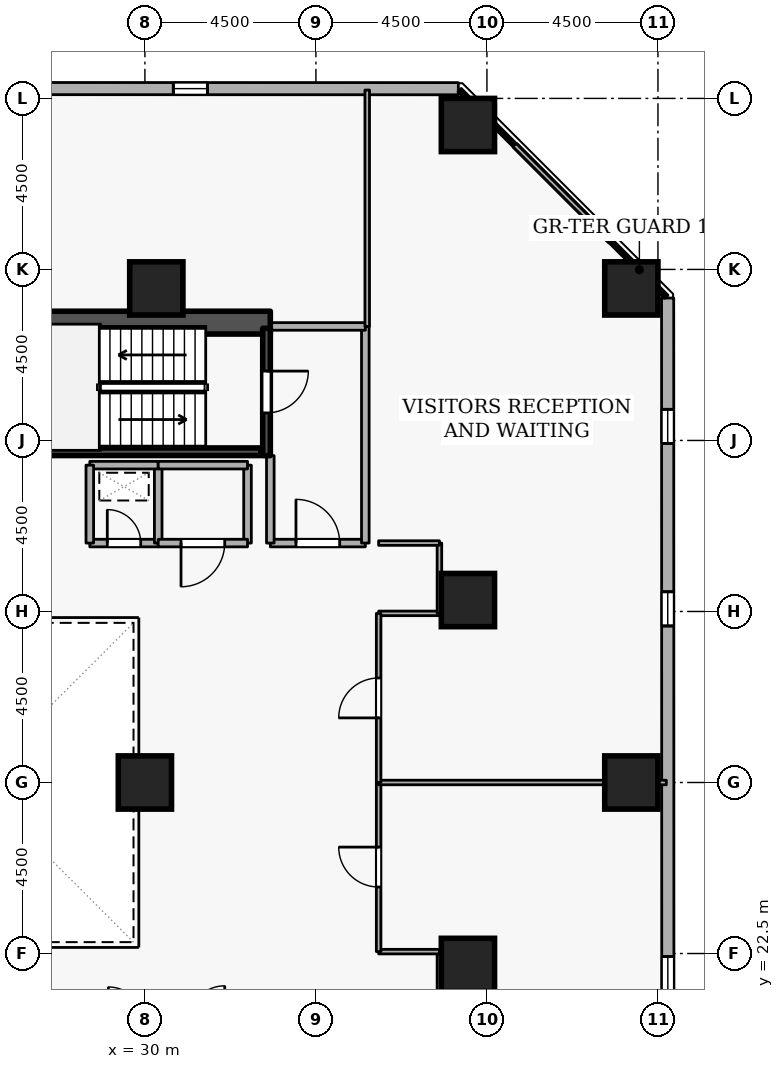
"""IFC4 building model, lengths in metres.
Left out: names, types, materials, properties, quantities, classifications, styles, units other than length and angle.
Written with IfcOpenShell. Run it as: python <this file> out.ifc"""

import sys

from ifc_helpers import new_model, si_unit, direction, frame, frame_2d, origin, origin_2d, place, context, subcontext, project, spatial, rectangle, extrude, element, fill, save


model = new_model("IFC4")
c1 = context("Model", 3, precision=1e-05, world=origin(), true_north=direction((0.0, 1.0)))
c2 = subcontext(c1, "Body", "Model", "MODEL_VIEW")
j1 = project(units=[si_unit("LENGTHUNIT", "METRE"), si_unit("PLANEANGLEUNIT", "RADIAN")], contexts=[c1])
p1 = place(None, origin())
s1 = spatial("IfcSite", under=j1, at=p1, CompositionType="ELEMENT")
p2 = place(p1, origin())
s2 = spatial("IfcBuilding", under=s1, at=p2, CompositionType="ELEMENT")
p3 = place(p2, frame((0.0, 0.0, 35.1)))
s3 = spatial("IfcBuildingStorey", under=s2, at=p3, CompositionType="ELEMENT", Elevation=35.1)
p4 = place(p3, frame((17.7, 39.1, 0.0), z_axis=(0.0, 0.0, 1.0), x_axis=(1.0, 0.0, 0.0)))
e1 = element("IfcWall", 1, at=p4, inside=s3, PredefinedType="SHEAR", context=c2, shape_type="SweptSolid", body=[
    extrude(rectangle(XDim=15.6, YDim=0.6, at=frame_2d((7.8, 0.0))), origin(), (0.0, 0.0, 1.0), 3.6),
])
for number, where, z_axis, x_axis in (
    (2, (42.8, 27.0, 0.0), (0.0, 0.0, 1.0), (1.0, 0.0, 0.0)),
    (3, (42.8, 40.0, 0.0), (0.0, 0.0, 1.0), (1.0, 0.0, 0.0)),
    (4, (38.5, 44.3, 0.0), (0.0, 0.0, 1.0), (1.0, 0.0, 0.0)),
    (5, (38.5, 22.2, 0.0), (0.0, 0.0, 1.0), (1.0, 0.0, 0.0)),
    (6, (38.5, 31.8, 0.0), (0.0, 0.0, 1.0), (1.0, 0.0, 0.0)),
    (7, (30.3, 40.0, 0.0), (0.0, 0.0, 1.0), (1.0, 0.0, 0.0)),
    (8, (30.0, 27.0, 0.0), (0.0, 0.0, 1.0), (1.0, 0.0, 0.0)),
):
    element("IfcColumn", number, at=place(p3, frame(where, z_axis=z_axis, x_axis=x_axis)), inside=s3, PredefinedType="COLUMN", context=c2, shape_type="SweptSolid", body=[
        extrude(rectangle(XDim=1.4, YDim=1.4, at=origin_2d()), origin(), (0.0, 0.0, 1.0), 3.6),
    ])
p5 = place(p3, frame((43.765, 5.319, 0.0), z_axis=(0.0, 0.0, 1.0), x_axis=(-0.000276554545, 0.999999961759, 0.0)))
e9 = element("IfcWall", 9, at=p5, inside=s3, PredefinedType="STANDARD", context=c2, shape_type="SweptSolid", body=[
    extrude(rectangle(XDim=34.429, YDim=0.32, at=frame_2d((17.214, 0.0))), origin(), (0.0, 0.0, 1.0), 2.7),
])
p6 = place(p5, frame((1.8, 0.0, 0.72)))
e10 = element("IfcOpeningElement", 10, at=p6, cuts=e9, PredefinedType="OPENING", context=c2, shape_type="SweptSolid", body=[
    extrude(rectangle(XDim=0.9, YDim=1.75, at=frame_2d((0.45, 0.875))), frame((0.0, 0.17, 0.0), z_axis=(0.0, -1.0, 0.0), x_axis=(1.0, 0.0, 0.0)), (0.0, 0.0, 1.0), 0.34),
])
p7 = place(p5, frame((6.6, 0.0, 0.72)))
e11 = element("IfcOpeningElement", 11, at=p7, cuts=e9, PredefinedType="OPENING", context=c2, shape_type="SweptSolid", body=[
    extrude(rectangle(XDim=0.9, YDim=1.75, at=frame_2d((0.45, 0.875))), frame((0.0, 0.17, 0.0), z_axis=(0.0, -1.0, 0.0), x_axis=(1.0, 0.0, 0.0)), (0.0, 0.0, 1.0), 0.34),
])
p8 = place(p5, frame((11.4, 0.0, 0.72)))
e12 = element("IfcOpeningElement", 12, at=p8, cuts=e9, PredefinedType="OPENING", context=c2, shape_type="SweptSolid", body=[
    extrude(rectangle(XDim=0.9, YDim=1.75, at=frame_2d((0.45, 0.875))), frame((0.0, 0.17, 0.0), z_axis=(0.0, -1.0, 0.0), x_axis=(1.0, 0.0, 0.0)), (0.0, 0.0, 1.0), 0.34),
])
p9 = place(p5, frame((16.2, 0.0, 0.72)))
e13 = element("IfcOpeningElement", 13, at=p9, cuts=e9, PredefinedType="OPENING", context=c2, shape_type="SweptSolid", body=[
    extrude(rectangle(XDim=0.9, YDim=1.75, at=frame_2d((0.45, 0.875))), frame((0.0, 0.17, 0.0), z_axis=(0.0, -1.0, 0.0), x_axis=(1.0, 0.0, 0.0)), (0.0, 0.0, 1.0), 0.34),
])
p10 = place(p5, frame((25.8, 0.0, 0.72)))
e14 = element("IfcOpeningElement", 14, at=p10, cuts=e9, PredefinedType="OPENING", context=c2, shape_type="SweptSolid", body=[
    extrude(rectangle(XDim=0.9, YDim=1.75, at=frame_2d((0.45, 0.875))), frame((0.0, 0.17, 0.0), z_axis=(0.0, -1.0, 0.0), x_axis=(1.0, 0.0, 0.0)), (0.0, 0.0, 1.0), 0.34),
])
p11 = place(p5, frame((30.6, 0.0, 0.72)))
e15 = element("IfcOpeningElement", 15, at=p11, cuts=e9, PredefinedType="OPENING", context=c2, shape_type="SweptSolid", body=[
    extrude(rectangle(XDim=0.9, YDim=1.75, at=frame_2d((0.45, 0.875))), frame((0.0, 0.17, 0.0), z_axis=(0.0, -1.0, 0.0), x_axis=(1.0, 0.0, 0.0)), (0.0, 0.0, 1.0), 0.34),
])
p12 = place(p3, frame((38.248, 45.255, 0.0), z_axis=(0.0, 0.0, 1.0), x_axis=(-0.999999961759, 0.000276554545, 0.0)))
e16 = element("IfcWall", 16, at=p12, inside=s3, PredefinedType="STANDARD", context=c2, shape_type="SweptSolid", body=[
    extrude(rectangle(XDim=34.429, YDim=0.32, at=frame_2d((17.214, 0.0))), origin(), (0.0, 0.0, 1.0), 2.7),
])
p13 = place(p12, frame((6.6, 0.0, 0.72)))
e17 = element("IfcOpeningElement", 17, at=p13, cuts=e16, PredefinedType="OPENING", context=c2, shape_type="SweptSolid", body=[
    extrude(rectangle(XDim=0.9, YDim=1.75, at=frame_2d((0.45, 0.875))), frame((0.0, 0.17, 0.0), z_axis=(0.0, -1.0, 0.0), x_axis=(1.0, 0.0, 0.0)), (0.0, 0.0, 1.0), 0.34),
])
p14 = place(p12, frame((16.2, 0.0, 0.72)))
e18 = element("IfcOpeningElement", 18, at=p14, cuts=e16, PredefinedType="OPENING", context=c2, shape_type="SweptSolid", body=[
    extrude(rectangle(XDim=0.9, YDim=1.75, at=frame_2d((0.45, 0.875))), frame((0.0, 0.17, 0.0), z_axis=(0.0, -1.0, 0.0), x_axis=(1.0, 0.0, 0.0)), (0.0, 0.0, 1.0), 0.34),
])
p15 = place(p12, frame((21.0, 0.0, 0.72)))
e19 = element("IfcOpeningElement", 19, at=p15, cuts=e16, PredefinedType="OPENING", context=c2, shape_type="SweptSolid", body=[
    extrude(rectangle(XDim=0.9, YDim=1.75, at=frame_2d((0.45, 0.875))), frame((0.0, 0.17, 0.0), z_axis=(0.0, -1.0, 0.0), x_axis=(1.0, 0.0, 0.0)), (0.0, 0.0, 1.0), 0.34),
])
p16 = place(p12, frame((30.6, 0.0, 0.72)))
e20 = element("IfcOpeningElement", 20, at=p16, cuts=e16, PredefinedType="OPENING", context=c2, shape_type="SweptSolid", body=[
    extrude(rectangle(XDim=0.9, YDim=1.75, at=frame_2d((0.45, 0.875))), frame((0.0, 0.17, 0.0), z_axis=(0.0, -1.0, 0.0), x_axis=(1.0, 0.0, 0.0)), (0.0, 0.0, 1.0), 0.34),
])
p17 = place(p3, frame((33.2, 38.95, 0.0), z_axis=(0.0, 0.0, 1.0), x_axis=(0.0, -1.0, 0.0)))
e21 = element("IfcWall", 21, at=p17, inside=s3, PredefinedType="SHEAR", context=c2, shape_type="SweptSolid", body=[
    extrude(rectangle(XDim=3.35, YDim=0.2, at=frame_2d((1.675, 0.0))), origin(), (0.0, 0.0, 1.0), 3.6),
])
p18 = place(p17, frame((1.125, 0.0, 0.0)))
e22 = element("IfcOpeningElement", 22, at=p18, cuts=e21, PredefinedType="OPENING", context=c2, shape_type="SweptSolid", body=[
    extrude(rectangle(XDim=1.1, YDim=2.1, at=frame_2d((0.55, 1.05))), frame((0.0, 0.11, 0.0), z_axis=(0.0, -1.0, 0.0), x_axis=(1.0, 0.0, 0.0)), (0.0, 0.0, 1.0), 0.22),
])
p19 = place(p3, frame((25.95, 35.703, 0.0), z_axis=(0.0, 0.0, 1.0), x_axis=(1.0, 0.0, 0.0)))
e23 = element("IfcWall", 23, at=p19, inside=s3, PredefinedType="SHEAR", context=c2, shape_type="SweptSolid", body=[
    extrude(rectangle(XDim=7.1, YDim=0.2, at=frame_2d((3.55, 0.0))), origin(), (0.0, 0.0, 1.0), 3.6),
])
p20 = place(p3, frame((33.3, 33.3, 0.0), z_axis=(0.0, 0.0, 1.0), x_axis=(1.0, 0.0, 0.0)))
e24 = element("IfcWall", 24, at=p20, inside=s3, PredefinedType="STANDARD", context=c2, shape_type="SweptSolid", body=[
    extrude(rectangle(XDim=2.5, YDim=0.2, at=frame_2d((1.25, 0.0))), origin(), (0.0, 0.0, 1.0), 3.34),
])
p21 = place(p20, frame((0.675, 0.0, 0.0)))
e25 = element("IfcOpeningElement", 25, at=p21, cuts=e24, PredefinedType="OPENING", context=c2, shape_type="SweptSolid", body=[
    extrude(rectangle(XDim=1.15, YDim=2.1, at=frame_2d((0.575, 1.05))), frame((0.0, 0.11, 0.0), z_axis=(0.0, -1.0, 0.0), x_axis=(1.0, 0.0, 0.0)), (0.0, 0.0, 1.0), 0.22),
])
p22 = place(p3, frame((35.8, 33.3, 0.0), z_axis=(0.0, 0.0, 1.0), x_axis=(0.0, 1.0, 0.0)))
e26 = element("IfcWall", 26, at=p22, inside=s3, PredefinedType="STANDARD", context=c2, shape_type="SweptSolid", body=[
    extrude(rectangle(XDim=5.7, YDim=0.2, at=frame_2d((2.85, 0.0))), origin(), (0.0, 0.0, 1.0), 3.34),
])
p23 = place(p3, frame((35.8, 39.0, 0.0), z_axis=(0.0, 0.0, 1.0), x_axis=(-1.0, 0.0, 0.0)))
e27 = element("IfcWall", 27, at=p23, inside=s3, PredefinedType="STANDARD", context=c2, shape_type="SweptSolid", body=[
    extrude(rectangle(XDim=2.5, YDim=0.2, at=frame_2d((1.25, 0.0))), origin(), (0.0, 0.0, 1.0), 3.34),
])
p24 = place(p3, frame((33.3, 35.6, 0.0), z_axis=(0.0, 0.0, 1.0), x_axis=(0.0, -1.0, 0.0)))
e28 = element("IfcWall", 28, at=p24, inside=s3, PredefinedType="STANDARD", context=c2, shape_type="SweptSolid", body=[
    extrude(rectangle(XDim=2.3, YDim=0.2, at=frame_2d((1.15, 0.0))), origin(), (0.0, 0.0, 1.0), 2.545),
])
p25 = place(p3, frame((28.55, 33.3, 0.0), z_axis=(0.0, 0.0, 1.0), x_axis=(1.0, 0.0, 0.0)))
e29 = element("IfcWall", 29, at=p25, inside=s3, PredefinedType="STANDARD", context=c2, shape_type="SweptSolid", body=[
    extrude(rectangle(XDim=1.8, YDim=0.2, at=frame_2d((0.9, 0.0))), origin(), (0.0, 0.0, 1.0), 3.34),
])
p26 = place(p25, frame((0.46, 0.0, 0.0)))
e30 = element("IfcOpeningElement", 30, at=p26, cuts=e29, PredefinedType="OPENING", context=c2, shape_type="SweptSolid", body=[
    extrude(rectangle(XDim=0.88, YDim=2.04, at=frame_2d((0.44, 1.02))), frame((0.0, 0.11, 0.0), z_axis=(0.0, -1.0, 0.0), x_axis=(1.0, 0.0, 0.0)), (0.0, 0.0, 1.0), 0.22),
])
p27 = place(p3, frame((30.35, 33.3, 0.0), z_axis=(0.0, 0.0, 1.0), x_axis=(0.0, 1.0, 0.0)))
e31 = element("IfcWall", 31, at=p27, inside=s3, PredefinedType="STANDARD", context=c2, shape_type="SweptSolid", body=[
    extrude(rectangle(XDim=2.05, YDim=0.2, at=frame_2d((1.025, 0.0))), origin(), (0.0, 0.0, 1.0), 3.34),
])
p28 = place(p3, frame((30.35, 35.35, 0.0), z_axis=(0.0, 0.0, 1.0), x_axis=(-1.0, 0.0, 0.0)))
e32 = element("IfcWall", 32, at=p28, inside=s3, PredefinedType="STANDARD", context=c2, shape_type="SweptSolid", body=[
    extrude(rectangle(XDim=1.8, YDim=0.2, at=frame_2d((0.9, 0.0))), origin(), (0.0, 0.0, 1.0), 3.34),
])
p29 = place(p3, frame((28.55, 35.35, 0.0), z_axis=(0.0, 0.0, 1.0), x_axis=(0.0, -1.0, 0.0)))
e33 = element("IfcWall", 33, at=p29, inside=s3, PredefinedType="STANDARD", context=c2, shape_type="SweptSolid", body=[
    extrude(rectangle(XDim=2.05, YDim=0.2, at=frame_2d((1.025, 0.0))), origin(), (0.0, 0.0, 1.0), 3.34),
])
p30 = place(p3, frame((32.7, 35.35, 0.0), z_axis=(0.0, 0.0, 1.0), x_axis=(0.0, -1.0, 0.0)))
e34 = element("IfcWall", 34, at=p30, inside=s3, PredefinedType="STANDARD", context=c2, shape_type="SweptSolid", body=[
    extrude(rectangle(XDim=2.05, YDim=0.2, at=frame_2d((1.025, 0.0))), origin(), (0.0, 0.0, 1.0), 2.545),
])
p31 = place(p3, frame((32.7, 33.3, 0.0), z_axis=(0.0, 0.0, 1.0), x_axis=(-1.0, 0.0, 0.0)))
e35 = element("IfcWall", 35, at=p31, inside=s3, PredefinedType="STANDARD", context=c2, shape_type="SweptSolid", body=[
    extrude(rectangle(XDim=2.35, YDim=0.2, at=frame_2d((1.175, 0.0))), origin(), (0.0, 0.0, 1.0), 3.34),
])
p32 = place(p31, frame((0.6, 0.0, 0.0)))
e36 = element("IfcOpeningElement", 36, at=p32, cuts=e35, PredefinedType="OPENING", context=c2, shape_type="SweptSolid", body=[
    extrude(rectangle(XDim=1.15, YDim=2.1, at=frame_2d((0.575, 1.05))), frame((0.0, 0.11, 0.0), z_axis=(0.0, -1.0, 0.0), x_axis=(1.0, 0.0, 0.0)), (0.0, 0.0, 1.0), 0.22),
])
p33 = place(p3, frame((30.35, 35.35, 0.0), z_axis=(0.0, 0.0, 1.0), x_axis=(1.0, 0.0, 0.0)))
e37 = element("IfcWall", 37, at=p33, inside=s3, PredefinedType="STANDARD", context=c2, shape_type="SweptSolid", body=[
    extrude(rectangle(XDim=2.35, YDim=0.2, at=frame_2d((1.175, 0.0))), origin(), (0.0, 0.0, 1.0), 3.34),
])
p34 = place(p3, frame((37.75, 20.7, 0.0), z_axis=(0.0, 0.0, 1.0), x_axis=(0.0, 1.0, 0.0)))
e38 = element("IfcWall", 38, at=p34, inside=s3, PredefinedType="PARTITIONING", context=c2, shape_type="SweptSolid", body=[
    extrude(rectangle(XDim=1.85, YDim=0.12, at=frame_2d((0.925, 0.0))), origin(), (0.0, 0.0, 1.0), 3.34),
])
p35 = place(p3, frame((37.75, 22.55, 0.0), z_axis=(0.0, 0.0, 1.0), x_axis=(-1.0, 0.0, 0.0)))
e39 = element("IfcWall", 39, at=p35, inside=s3, PredefinedType="PARTITIONING", context=c2, shape_type="SweptSolid", body=[
    extrude(rectangle(XDim=1.6, YDim=0.12, at=frame_2d((0.8, 0.0))), origin(), (0.0, 0.0, 1.0), 3.34),
])
p36 = place(p3, frame((36.15, 22.55, 0.0), z_axis=(0.0, 0.0, 1.0), x_axis=(0.0, 1.0, 0.0)))
e40 = element("IfcWall", 40, at=p36, inside=s3, PredefinedType="PARTITIONING", context=c2, shape_type="SweptSolid", body=[
    extrude(rectangle(XDim=4.45, YDim=0.12, at=frame_2d((2.225, 0.0))), origin(), (0.0, 0.0, 1.0), 3.34),
])
p37 = place(p36, frame((1.7, 0.0, 0.0)))
e41 = element("IfcOpeningElement", 41, at=p37, cuts=e40, PredefinedType="OPENING", context=c2, shape_type="SweptSolid", body=[
    extrude(rectangle(XDim=1.05, YDim=2.1, at=frame_2d((0.525, 1.05))), frame((0.0, 0.07, 0.0), z_axis=(0.0, -1.0, 0.0), x_axis=(1.0, 0.0, 0.0)), (0.0, 0.0, 1.0), 0.14),
])
p38 = place(p3, frame((36.15, 27.0, 0.0), z_axis=(0.0, 0.0, 1.0), x_axis=(1.0, 0.0, 0.0)))
e42 = element("IfcWall", 42, at=p38, inside=s3, PredefinedType="PARTITIONING", context=c2, shape_type="SweptSolid", body=[
    extrude(rectangle(XDim=7.57, YDim=0.12, at=frame_2d((3.785, 0.0))), origin(), (0.0, 0.0, 1.0), 2.878),
])
p39 = place(p3, frame((36.15, 31.45, 0.0), z_axis=(0.0, 0.0, 1.0), x_axis=(1.0, 0.0, 0.0)))
e43 = element("IfcWall", 43, at=p39, inside=s3, PredefinedType="PARTITIONING", context=c2, shape_type="SweptSolid", body=[
    extrude(rectangle(XDim=1.6, YDim=0.12, at=frame_2d((0.8, 0.0))), origin(), (0.0, 0.0, 1.0), 3.34),
])
p40 = place(p3, frame((37.75, 31.45, 0.0), z_axis=(0.0, 0.0, 1.0), x_axis=(0.0, 1.0, 0.0)))
e44 = element("IfcWall", 44, at=p40, inside=s3, PredefinedType="PARTITIONING", context=c2, shape_type="SweptSolid", body=[
    extrude(rectangle(XDim=1.85, YDim=0.12, at=frame_2d((0.925, 0.0))), origin(), (0.0, 0.0, 1.0), 3.34),
])
p41 = place(p3, frame((37.75, 33.3, 0.0), z_axis=(0.0, 0.0, 1.0), x_axis=(-1.0, 0.0, 0.0)))
e45 = element("IfcWall", 45, at=p41, inside=s3, PredefinedType="PARTITIONING", context=c2, shape_type="SweptSolid", body=[
    extrude(rectangle(XDim=1.6, YDim=0.12, at=frame_2d((0.8, 0.0))), origin(), (0.0, 0.0, 1.0), 3.34),
])
p42 = place(p3, frame((35.85, 39.0, 0.0), z_axis=(0.0, 0.0, 1.0), x_axis=(0.0, 1.0, 0.0)))
e46 = element("IfcWall", 46, at=p42, inside=s3, PredefinedType="PARTITIONING", context=c2, shape_type="SweptSolid", body=[
    extrude(rectangle(XDim=6.22, YDim=0.12, at=frame_2d((3.11, 0.0))), origin(), (0.0, 0.0, 1.0), 3.34),
])
p43 = place(p3, frame((38.281, 45.22, 0.0), z_axis=(0.0, 0.0, 1.0), x_axis=(0.707106781187, -0.707106781187, 0.0)))
e47 = element("IfcWall", 47, at=p43, inside=s3, PredefinedType="PARTITIONING", context=c2, shape_type="SweptSolid", body=[
    extrude(rectangle(XDim=7.693, YDim=0.12, at=frame_2d((3.846, 0.0))), origin(), (0.0, 0.0, 1.0), 3.34),
])
p44 = place(p3, frame((36.15, 27.0, 0.0), z_axis=(0.0, 0.0, 1.0), x_axis=(0.0, 1.0, 0.0)))
e48 = element("IfcWall", 48, at=p44, inside=s3, PredefinedType="PARTITIONING", context=c2, shape_type="SweptSolid", body=[
    extrude(rectangle(XDim=4.45, YDim=0.12, at=frame_2d((2.225, 0.0))), origin(), (0.0, 0.0, 1.0), 3.34),
])
p45 = place(p44, frame((1.7, 0.0, 0.0)))
e49 = element("IfcOpeningElement", 49, at=p45, cuts=e48, PredefinedType="OPENING", context=c2, shape_type="SweptSolid", body=[
    extrude(rectangle(XDim=1.05, YDim=2.1, at=frame_2d((0.525, 1.05))), frame((0.0, 0.07, 0.0), z_axis=(0.0, -1.0, 0.0), x_axis=(1.0, 0.0, 0.0)), (0.0, 0.0, 1.0), 0.14),
])
p46 = place(p9, origin())
e50 = element("IfcWindow", 50, at=p46, inside=s3, PartitioningType="SINGLE_PANEL", PredefinedType="WINDOW", context=c2, shape_type="SweptSolid", body=[
    extrude(rectangle(XDim=0.9, YDim=1.75, at=frame_2d((0.45, 0.875))), frame((0.0, 0.03, 0.0), z_axis=(0.0, -1.0, 0.0), x_axis=(1.0, 0.0, 0.0)), (0.0, 0.0, 1.0), 0.06),
])
fill(e13, e50)
p47 = place(p10, origin())
e51 = element("IfcWindow", 51, at=p47, inside=s3, PartitioningType="SINGLE_PANEL", PredefinedType="WINDOW", context=c2, shape_type="SweptSolid", body=[
    extrude(rectangle(XDim=0.9, YDim=1.75, at=frame_2d((0.45, 0.875))), frame((0.0, 0.03, 0.0), z_axis=(0.0, -1.0, 0.0), x_axis=(1.0, 0.0, 0.0)), (0.0, 0.0, 1.0), 0.06),
])
fill(e14, e51)
p48 = place(p11, origin())
e52 = element("IfcWindow", 52, at=p48, inside=s3, PartitioningType="SINGLE_PANEL", PredefinedType="WINDOW", context=c2, shape_type="SweptSolid", body=[
    extrude(rectangle(XDim=0.9, YDim=1.75, at=frame_2d((0.45, 0.875))), frame((0.0, 0.03, 0.0), z_axis=(0.0, -1.0, 0.0), x_axis=(1.0, 0.0, 0.0)), (0.0, 0.0, 1.0), 0.06),
])
fill(e15, e52)
p49 = place(p13, origin())
e53 = element("IfcWindow", 53, at=p49, inside=s3, PartitioningType="SINGLE_PANEL", PredefinedType="WINDOW", context=c2, shape_type="SweptSolid", body=[
    extrude(rectangle(XDim=0.9, YDim=1.75, at=frame_2d((0.45, 0.875))), frame((0.0, 0.03, 0.0), z_axis=(0.0, -1.0, 0.0), x_axis=(1.0, 0.0, 0.0)), (0.0, 0.0, 1.0), 0.06),
])
fill(e17, e53)
p50 = place(p18, origin())
e54 = element("IfcDoor", 54, at=p50, inside=s3, OperationType="SINGLE_SWING_LEFT", PredefinedType="DOOR", context=c2, shape_type="SweptSolid", body=[
    extrude(rectangle(XDim=1.1, YDim=2.1, at=frame_2d((0.55, 1.05))), frame((0.0, 0.025, 0.0), z_axis=(0.0, -1.0, 0.0), x_axis=(1.0, 0.0, 0.0)), (0.0, 0.0, 1.0), 0.05),
])
fill(e22, e54)
p51 = place(p21, origin())
e55 = element("IfcDoor", 55, at=p51, inside=s3, OperationType="SINGLE_SWING_LEFT", PredefinedType="DOOR", context=c2, shape_type="SweptSolid", body=[
    extrude(rectangle(XDim=1.15, YDim=2.1, at=frame_2d((0.575, 1.05))), frame((0.0, 0.025, 0.0), z_axis=(0.0, -1.0, 0.0), x_axis=(1.0, 0.0, 0.0)), (0.0, 0.0, 1.0), 0.05),
])
fill(e25, e55)
p52 = place(p26, origin())
e56 = element("IfcDoor", 56, at=p52, inside=s3, OperationType="SINGLE_SWING_LEFT", PredefinedType="DOOR", context=c2, shape_type="SweptSolid", body=[
    extrude(rectangle(XDim=0.88, YDim=2.04, at=frame_2d((0.44, 1.02))), frame((0.0, 0.025, 0.0), z_axis=(0.0, -1.0, 0.0), x_axis=(1.0, 0.0, 0.0)), (0.0, 0.0, 1.0), 0.05),
])
fill(e30, e56)
p53 = place(p32, origin())
e57 = element("IfcDoor", 57, at=p53, inside=s3, OperationType="SINGLE_SWING_RIGHT", PredefinedType="DOOR", context=c2, shape_type="SweptSolid", body=[
    extrude(rectangle(XDim=1.15, YDim=2.1, at=frame_2d((0.575, 1.05))), frame((0.0, 0.025, 0.0), z_axis=(0.0, -1.0, 0.0), x_axis=(1.0, 0.0, 0.0)), (0.0, 0.0, 1.0), 0.05),
])
fill(e36, e57)
p54 = place(p37, origin())
e58 = element("IfcDoor", 58, at=p54, inside=s3, OperationType="SINGLE_SWING_RIGHT", PredefinedType="DOOR", context=c2, shape_type="SweptSolid", body=[
    extrude(rectangle(XDim=1.05, YDim=2.1, at=frame_2d((0.525, 1.05))), frame((0.0, 0.025, 0.0), z_axis=(0.0, -1.0, 0.0), x_axis=(1.0, 0.0, 0.0)), (0.0, 0.0, 1.0), 0.05),
])
fill(e41, e58)
p55 = place(p45, origin())
e59 = element("IfcDoor", 59, at=p55, inside=s3, OperationType="SINGLE_SWING_LEFT", PredefinedType="DOOR", context=c2, shape_type="SweptSolid", body=[
    extrude(rectangle(XDim=1.05, YDim=2.1, at=frame_2d((0.525, 1.05))), frame((0.0, 0.025, 0.0), z_axis=(0.0, -1.0, 0.0), x_axis=(1.0, 0.0, 0.0)), (0.0, 0.0, 1.0), 0.05),
])
fill(e49, e59)
save(model, sys.argv[1])
